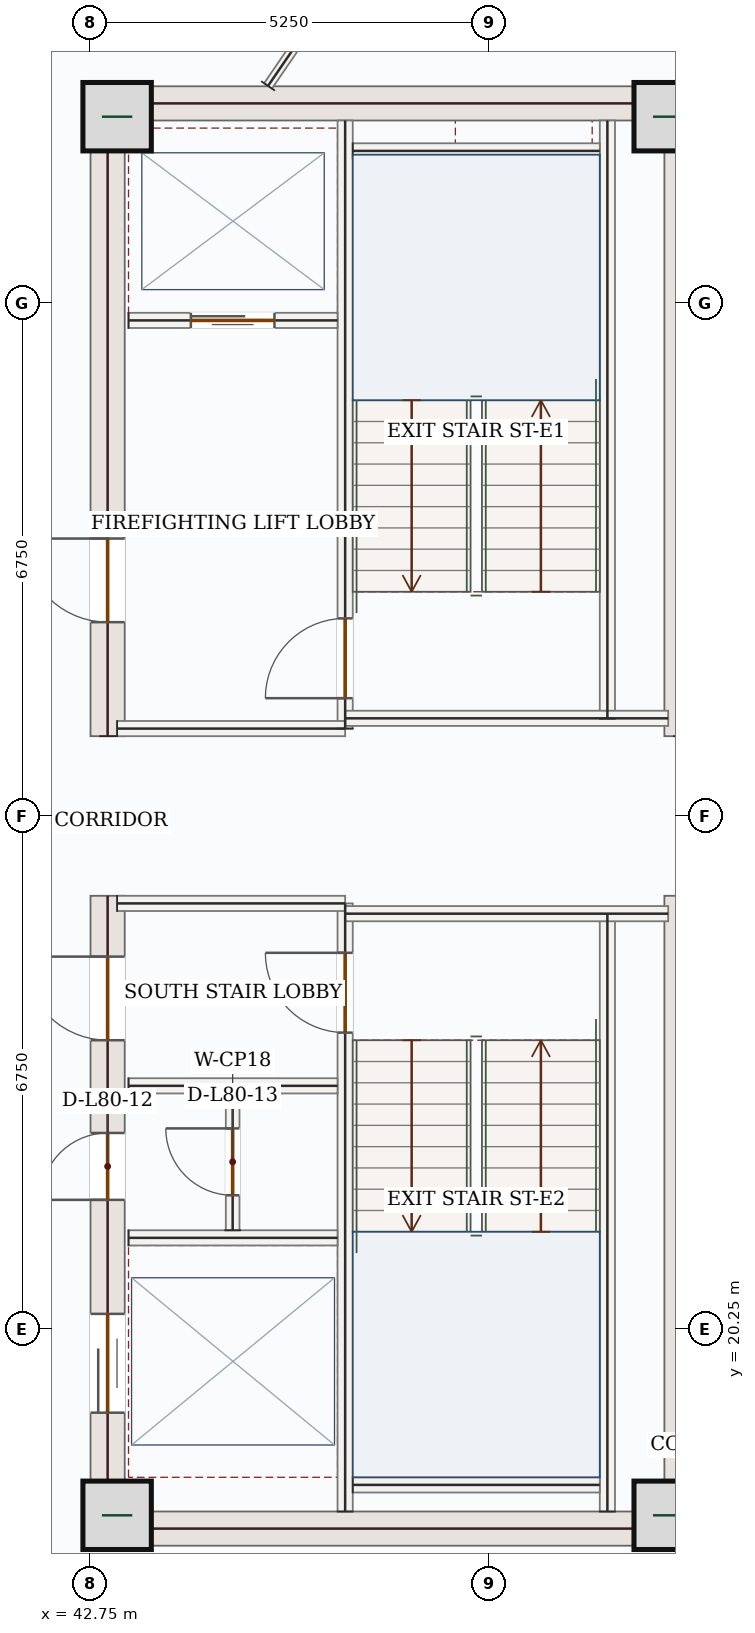
"""IFC4 building model, lengths in metres.
Left out: names, types, materials, properties, quantities, classifications, styles, units other than length and angle.
Written with IfcOpenShell. Run it as: python <this file> out.ifc"""

import sys

from ifc_helpers import new_model, si_unit, direction, frame, frame_2d, origin, origin_2d, place, context, subcontext, project, spatial, rectangle, extrude, source, transform, mapped, element, fill, save


model = new_model("IFC4")
c1 = context("Model", 3, precision=1e-05, world=origin(), true_north=direction((0.0, 1.0)))
c2 = subcontext(c1, "Body", "Model", "MODEL_VIEW")
j1 = project(units=[si_unit("LENGTHUNIT", "METRE"), si_unit("PLANEANGLEUNIT", "RADIAN")], contexts=[c1])
p1 = place(None, origin())
s1 = spatial("IfcSite", under=j1, at=p1, CompositionType="ELEMENT")
p2 = place(p1, origin())
s2 = spatial("IfcBuilding", under=s1, at=p2, CompositionType="ELEMENT")
p3 = place(p2, frame((0.0, 0.0, 331.05)))
s3 = spatial("IfcBuildingStorey", under=s2, at=p3, CompositionType="ELEMENT", Elevation=331.05)
p4 = place(p3, frame((42.975, 17.4, 0.0), z_axis=(0.0, 0.0, 1.0), x_axis=(0.0, 1.0, 0.0)))
e1 = element("IfcWall", 1, at=p4, inside=s3, PredefinedType="SHEAR", context=c2, shape_type="SweptSolid", body=[
    extrude(rectangle(XDim=8.55, YDim=0.45, at=frame_2d((4.275, 0.0))), origin(), (0.0, 0.0, 1.0), 3.5),
])
p5 = place(p4, frame((6.65, 0.0, 0.0)))
e2 = element("IfcOpeningElement", 2, at=p5, cuts=e1, PredefinedType="OPENING", context=c2, shape_type="SweptSolid", body=[
    extrude(rectangle(XDim=1.1, YDim=2.2, at=frame_2d((0.55, 1.1))), frame((0.0, 0.235, 0.0), z_axis=(0.0, -1.0, 0.0), x_axis=(1.0, 0.0, 0.0)), (0.0, 0.0, 1.0), 0.47),
])
p6 = place(p4, frame((1.75, 0.0, 0.0)))
e3 = element("IfcOpeningElement", 3, at=p6, cuts=e1, PredefinedType="OPENING", context=c2, shape_type="SweptSolid", body=[
    extrude(rectangle(XDim=1.3, YDim=2.2, at=frame_2d((0.65, 1.1))), frame((0.0, 0.235, 0.0), z_axis=(0.0, -1.0, 0.0), x_axis=(1.0, 0.0, 0.0)), (0.0, 0.0, 1.0), 0.47),
])
p7 = place(p4, frame((4.55, 0.0, 0.0)))
e4 = element("IfcOpeningElement", 4, at=p7, cuts=e1, PredefinedType="OPENING", context=c2, shape_type="SweptSolid", body=[
    extrude(rectangle(XDim=0.88, YDim=2.1, at=frame_2d((0.44, 1.05))), frame((0.0, 0.235, 0.0), z_axis=(0.0, -1.0, 0.0), x_axis=(1.0, 0.0, 0.0)), (0.0, 0.0, 1.0), 0.47),
])
p8 = place(p3, frame((42.975, 28.05, 0.0), z_axis=(0.0, 0.0, 1.0), x_axis=(0.0, 1.0, 0.0)))
e5 = element("IfcWall", 5, at=p8, inside=s3, PredefinedType="SHEAR", context=c2, shape_type="SweptSolid", body=[
    extrude(rectangle(XDim=8.55, YDim=0.45, at=frame_2d((4.275, 0.0))), origin(), (0.0, 0.0, 1.0), 3.5),
])
p9 = place(p8, frame((1.5, 0.0, 0.0)))
e6 = element("IfcOpeningElement", 6, at=p9, cuts=e5, PredefinedType="OPENING", context=c2, shape_type="SweptSolid", body=[
    extrude(rectangle(XDim=1.1, YDim=2.2, at=frame_2d((0.55, 1.1))), frame((0.0, 0.235, 0.0), z_axis=(0.0, -1.0, 0.0), x_axis=(1.0, 0.0, 0.0)), (0.0, 0.0, 1.0), 0.47),
])
m1 = source(origin(), c2, "Body", "SweptSolid", [
    extrude(rectangle(XDim=8.55, YDim=0.45, at=frame_2d((4.275, 0.0))), origin(), (0.0, 0.0, 1.0), 3.5),
])
for number, where, z_axis, x_axis in (
    (7, (50.525, 17.4, 0.0), (0.0, 0.0, 1.0), (0.0, 1.0, 0.0)),
    (8, (50.525, 28.05, 0.0), (0.0, 0.0, 1.0), (0.0, 1.0, 0.0)),
):
    element("IfcWall", number, at=place(p3, frame(where, z_axis=z_axis, x_axis=x_axis)), inside=s3, PredefinedType="SHEAR", context=c2, shape_type="MappedRepresentation", body=[
        mapped(m1, transform((0.0, 0.0, 0.0), x_axis=(1.0, 0.0, 0.0), y_axis=(0.0, 1.0, 0.0), z_axis=(0.0, 0.0, 1.0), scale=1.0)),
    ])
m2 = source(origin(), c2, "Body", "SweptSolid", [
    extrude(rectangle(XDim=7.1, YDim=0.45, at=frame_2d((3.55, 0.0))), origin(), (0.0, 0.0, 1.0), 3.5),
])
for number, where, z_axis, x_axis in (
    (9, (43.2, 17.625, 0.0), (0.0, 0.0, 1.0), (1.0, 0.0, 0.0)),
    (10, (43.2, 36.375, 0.0), (0.0, 0.0, 1.0), (1.0, 0.0, 0.0)),
):
    element("IfcWall", number, at=place(p3, frame(where, z_axis=z_axis, x_axis=x_axis)), inside=s3, PredefinedType="SHEAR", context=c2, shape_type="MappedRepresentation", body=[
        mapped(m2, transform((0.0, 0.0, 0.0), x_axis=(1.0, 0.0, 0.0), y_axis=(0.0, 1.0, 0.0), z_axis=(0.0, 0.0, 1.0), scale=1.0)),
    ])
m3 = source(origin(), c2, "Body", "SweptSolid", [
    extrude(rectangle(XDim=0.9, YDim=0.9, at=origin_2d()), origin(), (0.0, 0.0, 1.0), 3.75),
])
for number, where, z_axis, x_axis in (
    (11, (43.1, 17.8, 0.0), (0.0, 0.0, 1.0), (1.0, 0.0, 0.0)),
    (12, (50.35, 17.8, 0.0), (0.0, 0.0, 1.0), (1.0, 0.0, 0.0)),
    (13, (43.1, 36.2, 0.0), (0.0, 0.0, 1.0), (1.0, 0.0, 0.0)),
    (14, (50.35, 36.2, 0.0), (0.0, 0.0, 1.0), (1.0, 0.0, 0.0)),
):
    element("IfcColumn", number, at=place(p3, frame(where, z_axis=z_axis, x_axis=x_axis)), inside=s3, PredefinedType="COLUMN", context=c2, shape_type="MappedRepresentation", body=[
        mapped(m3, transform((0.0, 0.0, 0.0), x_axis=(1.0, 0.0, 0.0), y_axis=(0.0, 1.0, 0.0), z_axis=(0.0, 0.0, 1.0), scale=1.0)),
    ])
p10 = place(p3, frame((50.432, 38.17, 0.0), z_axis=(0.0, 0.0, 1.0), x_axis=(0.707106781187, -0.707106781187, 0.0)))
e15 = element("IfcWall", 15, at=p10, inside=s3, PredefinedType="SOLIDWALL", context=c2, shape_type="SweptSolid", body=[
    extrude(rectangle(XDim=3.716, YDim=0.28, at=frame_2d((1.858, 0.0))), origin(), (0.0, 0.0, 1.0), 3.5),
])
p11 = place(p10, frame((1.108, 0.0, 0.85)))
e16 = element("IfcOpeningElement", 16, at=p11, cuts=e15, PredefinedType="OPENING", context=c2, shape_type="SweptSolid", body=[
    extrude(rectangle(XDim=1.5, YDim=1.5, at=frame_2d((0.75, 0.75))), frame((0.0, 0.15, 0.0), z_axis=(0.0, -1.0, 0.0), x_axis=(1.0, 0.0, 0.0)), (0.0, 0.0, 1.0), 0.3),
])
m4 = source(origin(), c2, "Body", "SweptSolid", [
    extrude(rectangle(XDim=3.709, YDim=0.28, at=frame_2d((1.855, 0.0))), origin(), (0.0, 0.0, 1.0), 3.5),
])
p12 = place(p3, frame((53.06, 18.458, 0.0), z_axis=(0.0, 0.0, 1.0), x_axis=(-0.707106781187, -0.707106781187, 0.0)))
e17 = element("IfcWall", 17, at=p12, inside=s3, PredefinedType="SOLIDWALL", context=c2, shape_type="MappedRepresentation", body=[
    mapped(m4, transform((0.0, 0.0, 0.0), x_axis=(1.0, 0.0, 0.0), y_axis=(0.0, 1.0, 0.0), z_axis=(0.0, 0.0, 1.0), scale=1.0)),
])
m5 = source(origin(), c2, "Body", "SweptSolid", [
    extrude(rectangle(XDim=7.87, YDim=0.2, at=frame_2d((3.935, 0.0))), origin(), (0.0, 0.0, 1.0), 3.5),
])
for number, where, z_axis, x_axis in (
    (18, (49.55, 17.85, 0.0), (0.0, 0.0, 1.0), (0.0, 1.0, 0.0)),
    (19, (49.55, 28.28, 0.0), (0.0, 0.0, 1.0), (0.0, 1.0, 0.0)),
):
    element("IfcWall", number, at=place(p3, frame(where, z_axis=z_axis, x_axis=x_axis)), inside=s3, PredefinedType="SOLIDWALL", context=c2, shape_type="MappedRepresentation", body=[
        mapped(m5, transform((0.0, 0.0, 0.0), x_axis=(1.0, 0.0, 0.0), y_axis=(0.0, 1.0, 0.0), z_axis=(0.0, 0.0, 1.0), scale=1.0)),
    ])
p13 = place(p3, frame((46.1, 17.85, 0.0), z_axis=(0.0, 0.0, 1.0), x_axis=(0.0, 1.0, 0.0)))
e20 = element("IfcWall", 20, at=p13, inside=s3, PredefinedType="SOLIDWALL", context=c2, shape_type="SweptSolid", body=[
    extrude(rectangle(XDim=8.0, YDim=0.2, at=frame_2d((4.0, 0.0))), origin(), (0.0, 0.0, 1.0), 3.5),
])
p14 = place(p13, frame((6.3, 0.0, 0.0)))
e21 = element("IfcOpeningElement", 21, at=p14, cuts=e20, PredefinedType="OPENING", context=c2, shape_type="SweptSolid", body=[
    extrude(rectangle(XDim=1.05, YDim=2.15, at=frame_2d((0.525, 1.075))), frame((0.0, 0.11, 0.0), z_axis=(0.0, -1.0, 0.0), x_axis=(1.0, 0.0, 0.0)), (0.0, 0.0, 1.0), 0.22),
])
p15 = place(p3, frame((46.1, 28.15, 0.0), z_axis=(0.0, 0.0, 1.0), x_axis=(0.0, 1.0, 0.0)))
e22 = element("IfcWall", 22, at=p15, inside=s3, PredefinedType="SOLIDWALL", context=c2, shape_type="SweptSolid", body=[
    extrude(rectangle(XDim=8.0, YDim=0.2, at=frame_2d((4.0, 0.0))), origin(), (0.0, 0.0, 1.0), 3.5),
])
p16 = place(p15, frame((0.4, 0.0, 0.0)))
e23 = element("IfcOpeningElement", 23, at=p16, cuts=e22, PredefinedType="OPENING", context=c2, shape_type="SweptSolid", body=[
    extrude(rectangle(XDim=1.05, YDim=2.15, at=frame_2d((0.525, 1.075))), frame((0.0, 0.11, 0.0), z_axis=(0.0, -1.0, 0.0), x_axis=(1.0, 0.0, 0.0)), (0.0, 0.0, 1.0), 0.22),
])
m6 = source(origin(), c2, "Body", "SweptSolid", [
    extrude(rectangle(XDim=3.0, YDim=0.2, at=frame_2d((1.5, 0.0))), origin(), (0.0, 0.0, 1.0), 3.5),
])
p17 = place(p3, frame((43.1, 25.85, 0.0), z_axis=(0.0, 0.0, 1.0), x_axis=(1.0, 0.0, 0.0)))
e24 = element("IfcWall", 24, at=p17, inside=s3, PredefinedType="SOLIDWALL", context=c2, shape_type="MappedRepresentation", body=[
    mapped(m6, transform((0.0, 0.0, 0.0), x_axis=(1.0, 0.0, 0.0), y_axis=(0.0, 1.0, 0.0), z_axis=(0.0, 0.0, 1.0), scale=1.0)),
])
m7 = source(origin(), c2, "Body", "SweptSolid", [
    extrude(rectangle(XDim=4.25, YDim=0.2, at=frame_2d((2.125, 0.0))), origin(), (0.0, 0.0, 1.0), 3.5),
])
p18 = place(p3, frame((46.1, 25.715, 0.0), z_axis=(0.0, 0.0, 1.0), x_axis=(1.0, 0.0, 0.0)))
e25 = element("IfcWall", 25, at=p18, inside=s3, PredefinedType="SOLIDWALL", context=c2, shape_type="MappedRepresentation", body=[
    mapped(m7, transform((0.0, 0.0, 0.0), x_axis=(1.0, 0.0, 0.0), y_axis=(0.0, 1.0, 0.0), z_axis=(0.0, 0.0, 1.0), scale=1.0)),
])
p19 = place(p3, frame((43.1, 28.15, 0.0), z_axis=(0.0, 0.0, 1.0), x_axis=(1.0, 0.0, 0.0)))
e26 = element("IfcWall", 26, at=p19, inside=s3, PredefinedType="SOLIDWALL", context=c2, shape_type="MappedRepresentation", body=[
    mapped(m6, transform((0.0, 0.0, 0.0), x_axis=(1.0, 0.0, 0.0), y_axis=(0.0, 1.0, 0.0), z_axis=(0.0, 0.0, 1.0), scale=1.0)),
])
p20 = place(p3, frame((46.1, 28.285, 0.0), z_axis=(0.0, 0.0, 1.0), x_axis=(1.0, 0.0, 0.0)))
e27 = element("IfcWall", 27, at=p20, inside=s3, PredefinedType="SOLIDWALL", context=c2, shape_type="MappedRepresentation", body=[
    mapped(m7, transform((0.0, 0.0, 0.0), x_axis=(1.0, 0.0, 0.0), y_axis=(0.0, 1.0, 0.0), z_axis=(0.0, 0.0, 1.0), scale=1.0)),
])
m8 = source(origin(), c2, "Body", "SweptSolid", [
    extrude(rectangle(XDim=3.25, YDim=0.2, at=frame_2d((1.625, 0.0))), origin(), (0.0, 0.0, 1.0), 3.5),
])
for number, where, z_axis, x_axis in (
    (28, (46.2, 35.75, 0.0), (0.0, 0.0, 1.0), (1.0, 0.0, 0.0)),
    (29, (46.2, 18.2, 0.0), (0.0, 0.0, 1.0), (1.0, 0.0, 0.0)),
):
    element("IfcWall", number, at=place(p3, frame(where, z_axis=z_axis, x_axis=x_axis)), inside=s3, PredefinedType="SOLIDWALL", context=c2, shape_type="MappedRepresentation", body=[
        mapped(m8, transform((0.0, 0.0, 0.0), x_axis=(1.0, 0.0, 0.0), y_axis=(0.0, 1.0, 0.0), z_axis=(0.0, 0.0, 1.0), scale=1.0)),
    ])
p21 = place(p3, frame((43.25, 33.52, 0.0), z_axis=(0.0, 0.0, 1.0), x_axis=(1.0, 0.0, 0.0)))
e30 = element("IfcWall", 30, at=p21, inside=s3, PredefinedType="SOLIDWALL", context=c2, shape_type="SweptSolid", body=[
    extrude(rectangle(XDim=2.75, YDim=0.2, at=frame_2d((1.375, 0.0))), origin(), (0.0, 0.0, 1.0), 3.5),
])
p22 = place(p21, frame((0.82, 0.0, 0.0)))
e31 = element("IfcOpeningElement", 31, at=p22, cuts=e30, PredefinedType="OPENING", context=c2, shape_type="SweptSolid", body=[
    extrude(rectangle(XDim=1.1, YDim=2.15, at=frame_2d((0.55, 1.075))), frame((0.0, 0.11, 0.0), z_axis=(0.0, -1.0, 0.0), x_axis=(1.0, 0.0, 0.0)), (0.0, 0.0, 1.0), 0.22),
])
m9 = source(origin(), c2, "Body", "SweptSolid", [
    extrude(rectangle(XDim=2.75, YDim=0.2, at=frame_2d((1.375, 0.0))), origin(), (0.0, 0.0, 1.0), 3.5),
])
for number, where, z_axis, x_axis in (
    (32, (43.25, 23.45, 0.0), (0.0, 0.0, 1.0), (1.0, 0.0, 0.0)),
    (33, (43.25, 21.45, 0.0), (0.0, 0.0, 1.0), (1.0, 0.0, 0.0)),
):
    element("IfcWall", number, at=place(p3, frame(where, z_axis=z_axis, x_axis=x_axis)), inside=s3, PredefinedType="SOLIDWALL", context=c2, shape_type="MappedRepresentation", body=[
        mapped(m9, transform((0.0, 0.0, 0.0), x_axis=(1.0, 0.0, 0.0), y_axis=(0.0, 1.0, 0.0), z_axis=(0.0, 0.0, 1.0), scale=1.0)),
    ])
p23 = place(p3, frame((44.62, 21.55, 0.0), z_axis=(0.0, 0.0, 1.0), x_axis=(0.0, 1.0, 0.0)))
e34 = element("IfcWall", 34, at=p23, inside=s3, PredefinedType="PARTITIONING", context=c2, shape_type="SweptSolid", body=[
    extrude(rectangle(XDim=1.8, YDim=0.18, at=frame_2d((0.9, 0.0))), origin(), (0.0, 0.0, 1.0), 3.5),
])
p24 = place(p23, frame((0.46, 0.0, 0.0)))
e35 = element("IfcOpeningElement", 35, at=p24, cuts=e34, PredefinedType="OPENING", context=c2, shape_type="SweptSolid", body=[
    extrude(rectangle(XDim=0.88, YDim=2.1, at=frame_2d((0.44, 1.05))), frame((0.0, 0.1, 0.0), z_axis=(0.0, -1.0, 0.0), x_axis=(1.0, 0.0, 0.0)), (0.0, 0.0, 1.0), 0.2),
])
m10 = source(origin(), c2, "Body", "SweptSolid", [
    extrude(rectangle(XDim=2.511, YDim=0.125, at=frame_2d((1.255, 0.0))), origin(), (0.0, 0.0, 1.0), 3.5),
])
p25 = place(p3, frame((45.085, 36.605, 0.0), z_axis=(0.0, 0.0, 1.0), x_axis=(0.564980194272, 0.825104466162, 0.0)))
e36 = element("IfcWall", 36, at=p25, inside=s3, PredefinedType="PARTITIONING", context=c2, shape_type="MappedRepresentation", body=[
    mapped(m10, transform((0.0, 0.0, 0.0), x_axis=(1.0, 0.0, 0.0), y_axis=(0.0, 1.0, 0.0), z_axis=(0.0, 0.0, 1.0), scale=1.0)),
])
m11 = source(origin(), c2, "Body", "SweptSolid", [
    extrude(rectangle(XDim=1.05, YDim=2.15, at=frame_2d((0.525, 1.075))), frame((0.0, 0.025, 0.0), z_axis=(0.0, -1.0, 0.0), x_axis=(1.0, 0.0, 0.0)), (0.0, 0.0, 1.0), 0.05),
])
p26 = place(p16, origin())
e37 = element("IfcDoor", 37, at=p26, inside=s3, OperationType="SINGLE_SWING_LEFT", PredefinedType="DOOR", context=c2, shape_type="MappedRepresentation", body=[
    mapped(m11, transform((0.0, 0.0, 0.0), x_axis=(1.0, 0.0, 0.0), y_axis=(0.0, 1.0, 0.0), z_axis=(0.0, 0.0, 1.0), scale=1.0)),
])
fill(e23, e37)
p27 = place(p14, origin())
e38 = element("IfcDoor", 38, at=p27, inside=s3, OperationType="SINGLE_SWING_RIGHT", PredefinedType="DOOR", context=c2, shape_type="MappedRepresentation", body=[
    mapped(m11, transform((0.0, 0.0, 0.0), x_axis=(1.0, 0.0, 0.0), y_axis=(0.0, 1.0, 0.0), z_axis=(0.0, 0.0, 1.0), scale=1.0)),
])
fill(e21, e38)
m12 = source(origin(), c2, "Body", "SweptSolid", [
    extrude(rectangle(XDim=1.1, YDim=2.15, at=frame_2d((0.55, 1.075))), frame((0.0, 0.025, 0.0), z_axis=(0.0, -1.0, 0.0), x_axis=(1.0, 0.0, 0.0)), (0.0, 0.0, 1.0), 0.05),
])
p28 = place(p22, origin())
e39 = element("IfcDoor", 39, at=p28, inside=s3, OperationType="DOUBLE_DOOR_SLIDING", PredefinedType="DOOR", context=c2, shape_type="MappedRepresentation", body=[
    mapped(m12, transform((0.0, 0.0, 0.0), x_axis=(1.0, 0.0, 0.0), y_axis=(0.0, 1.0, 0.0), z_axis=(0.0, 0.0, 1.0), scale=1.0)),
])
fill(e31, e39)
m13 = source(origin(), c2, "Body", "SweptSolid", [
    extrude(rectangle(XDim=1.1, YDim=2.2, at=frame_2d((0.55, 1.1))), frame((0.0, 0.025, 0.0), z_axis=(0.0, -1.0, 0.0), x_axis=(1.0, 0.0, 0.0)), (0.0, 0.0, 1.0), 0.05),
])
p29 = place(p9, origin())
e40 = element("IfcDoor", 40, at=p29, inside=s3, OperationType="SINGLE_SWING_RIGHT", PredefinedType="DOOR", context=c2, shape_type="MappedRepresentation", body=[
    mapped(m13, transform((0.0, 0.0, 0.0), x_axis=(1.0, 0.0, 0.0), y_axis=(0.0, 1.0, 0.0), z_axis=(0.0, 0.0, 1.0), scale=1.0)),
])
fill(e6, e40)
p30 = place(p5, origin())
e41 = element("IfcDoor", 41, at=p30, inside=s3, OperationType="SINGLE_SWING_RIGHT", PredefinedType="DOOR", context=c2, shape_type="MappedRepresentation", body=[
    mapped(m13, transform((0.0, 0.0, 0.0), x_axis=(1.0, 0.0, 0.0), y_axis=(0.0, 1.0, 0.0), z_axis=(0.0, 0.0, 1.0), scale=1.0)),
])
fill(e2, e41)
m14 = source(origin(), c2, "Body", "SweptSolid", [
    extrude(rectangle(XDim=1.3, YDim=2.2, at=frame_2d((0.65, 1.1))), frame((0.0, 0.025, 0.0), z_axis=(0.0, -1.0, 0.0), x_axis=(1.0, 0.0, 0.0)), (0.0, 0.0, 1.0), 0.05),
])
p31 = place(p6, origin())
e42 = element("IfcDoor", 42, at=p31, inside=s3, OperationType="DOUBLE_DOOR_SLIDING", PredefinedType="DOOR", context=c2, shape_type="MappedRepresentation", body=[
    mapped(m14, transform((0.0, 0.0, 0.0), x_axis=(1.0, 0.0, 0.0), y_axis=(0.0, 1.0, 0.0), z_axis=(0.0, 0.0, 1.0), scale=1.0)),
])
fill(e3, e42)
m15 = source(origin(), c2, "Body", "SweptSolid", [
    extrude(rectangle(XDim=0.88, YDim=2.1, at=frame_2d((0.44, 1.05))), frame((0.0, 0.025, 0.0), z_axis=(0.0, -1.0, 0.0), x_axis=(1.0, 0.0, 0.0)), (0.0, 0.0, 1.0), 0.05),
])
p32 = place(p7, origin())
e43 = element("IfcDoor", 43, at=p32, inside=s3, OperationType="SINGLE_SWING_LEFT", PredefinedType="DOOR", context=c2, shape_type="MappedRepresentation", body=[
    mapped(m15, transform((0.0, 0.0, 0.0), x_axis=(1.0, 0.0, 0.0), y_axis=(0.0, 1.0, 0.0), z_axis=(0.0, 0.0, 1.0), scale=1.0)),
])
fill(e4, e43)
p33 = place(p24, origin())
e44 = element("IfcDoor", 44, at=p33, inside=s3, OperationType="SINGLE_SWING_RIGHT", PredefinedType="DOOR", context=c2, shape_type="MappedRepresentation", body=[
    mapped(m15, transform((0.0, 0.0, 0.0), x_axis=(1.0, 0.0, 0.0), y_axis=(0.0, 1.0, 0.0), z_axis=(0.0, 0.0, 1.0), scale=1.0)),
])
fill(e35, e44)
save(model, sys.argv[1])
